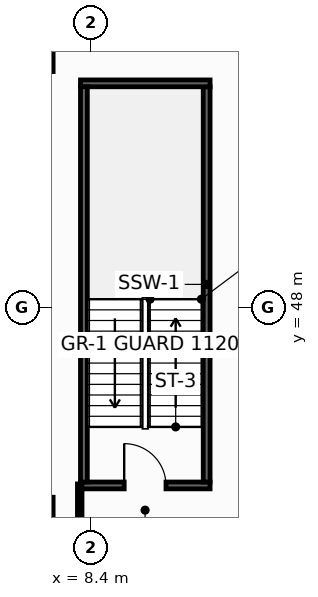
"""IFC4 building model, lengths in metres.
Left out: names, types, materials, properties, quantities, classifications, styles, units other than length and angle.
Written with IfcOpenShell. Run it as: python <this file> out.ifc"""

import sys

from ifc_helpers import new_model, si_unit, direction, frame, frame_2d, origin, origin_2d, place, context, subcontext, project, spatial, rectangle, hollow_rectangle, extrude, element, fill, save


model = new_model("IFC4")
c1 = context("Model", 3, precision=1e-05, world=origin(), true_north=direction((0.0, 1.0)))
c2 = subcontext(c1, "Body", "Model", "MODEL_VIEW")
j1 = project(units=[si_unit("LENGTHUNIT", "METRE"), si_unit("PLANEANGLEUNIT", "RADIAN")], contexts=[c1])
p1 = place(None, origin())
s1 = spatial("IfcSite", under=j1, at=p1, CompositionType="ELEMENT")
p2 = place(p1, origin())
s2 = spatial("IfcBuilding", under=s1, at=p2, CompositionType="ELEMENT")
p3 = place(p2, frame((0.0, 0.0, 47.2)))
s3 = spatial("IfcBuildingStorey", under=s2, at=p3, CompositionType="ELEMENT", Elevation=47.2)
for number, where, z_axis, x_axis in (
    (1, (6.8, 54.8, 0.0), (0.0, 0.0, 1.0), (1.0, 0.0, 0.0)),
    (2, (6.8, 42.4, 0.0), (0.0, 0.0, 1.0), (1.0, 0.0, 0.0)),
):
    element("IfcColumn", number, at=place(p3, frame(where, z_axis=z_axis, x_axis=x_axis)), inside=s3, PredefinedType="COLUMN", context=c2, shape_type="SweptSolid", body=[
        extrude(hollow_rectangle(XDim=1.2, YDim=1.2, WallThickness=0.055, at=origin_2d()), origin(), (0.0, 0.0, 1.0), 4.4),
    ])
p4 = place(p3, frame((8.12, 43.31, 0.0), z_axis=(0.0, 0.0, 1.0), x_axis=(1.0, 0.0, 0.0)))
e3 = element("IfcWall", 3, at=p4, inside=s3, PredefinedType="SHEAR", context=c2, shape_type="SweptSolid", body=[
    extrude(rectangle(XDim=3.41, YDim=0.18, at=frame_2d((1.705, 0.0))), origin(), (0.0, 0.0, 1.0), 4.15),
])
p5 = place(p4, frame((1.15, 0.0, 0.0)))
e4 = element("IfcOpeningElement", 4, at=p5, cuts=e3, PredefinedType="OPENING", context=c2, shape_type="SweptSolid", body=[
    extrude(rectangle(XDim=1.1, YDim=2.15, at=frame_2d((0.55, 1.075))), frame((0.0, 0.1, 0.0), z_axis=(0.0, -1.0, 0.0), x_axis=(1.0, 0.0, 0.0)), (0.0, 0.0, 1.0), 0.2),
])
p6 = place(p3, frame((11.44, 43.4, 0.0), z_axis=(0.0, 0.0, 1.0), x_axis=(0.0, 1.0, 0.0)))
e5 = element("IfcWall", 5, at=p6, inside=s3, PredefinedType="SHEAR", context=c2, shape_type="SweptSolid", body=[
    extrude(rectangle(XDim=10.4, YDim=0.18, at=frame_2d((5.2, 0.0))), origin(), (0.0, 0.0, 1.0), 4.15),
])
p7 = place(p3, frame((11.53, 53.89, 0.0), z_axis=(0.0, 0.0, 1.0), x_axis=(-1.0, 0.0, 0.0)))
e6 = element("IfcWall", 6, at=p7, inside=s3, PredefinedType="SHEAR", context=c2, shape_type="SweptSolid", body=[
    extrude(rectangle(XDim=3.41, YDim=0.18, at=frame_2d((1.705, 0.0))), origin(), (0.0, 0.0, 1.0), 4.15),
])
p8 = place(p3, frame((8.21, 53.8, 0.0), z_axis=(0.0, 0.0, 1.0), x_axis=(0.0, -1.0, 0.0)))
e7 = element("IfcWall", 7, at=p8, inside=s3, PredefinedType="SHEAR", context=c2, shape_type="SweptSolid", body=[
    extrude(rectangle(XDim=10.4, YDim=0.18, at=frame_2d((5.2, 0.0))), origin(), (0.0, 0.0, 1.0), 4.15),
])
p9 = place(p3, frame((8.1, 40.95, 0.0), z_axis=(0.0, 0.0, 1.0), x_axis=(0.0, 1.0, 0.0)))
e8 = element("IfcWall", 8, at=p9, inside=s3, PredefinedType="PARTITIONING", context=c2, shape_type="SweptSolid", body=[
    extrude(rectangle(XDim=2.4, YDim=0.12, at=frame_2d((1.2, 0.0))), origin(), (0.0, 0.0, 1.0), 3.335),
])
p10 = place(p5, origin())
e9 = element("IfcDoor", 9, at=p10, inside=s3, OperationType="SINGLE_SWING_LEFT", PredefinedType="DOOR", context=c2, shape_type="SweptSolid", body=[
    extrude(rectangle(XDim=1.1, YDim=2.15, at=frame_2d((0.55, 1.075))), frame((0.0, 0.025, 0.0), z_axis=(0.0, -1.0, 0.0), x_axis=(1.0, 0.0, 0.0)), (0.0, 0.0, 1.0), 0.05),
])
fill(e4, e9)
save(model, sys.argv[1])
